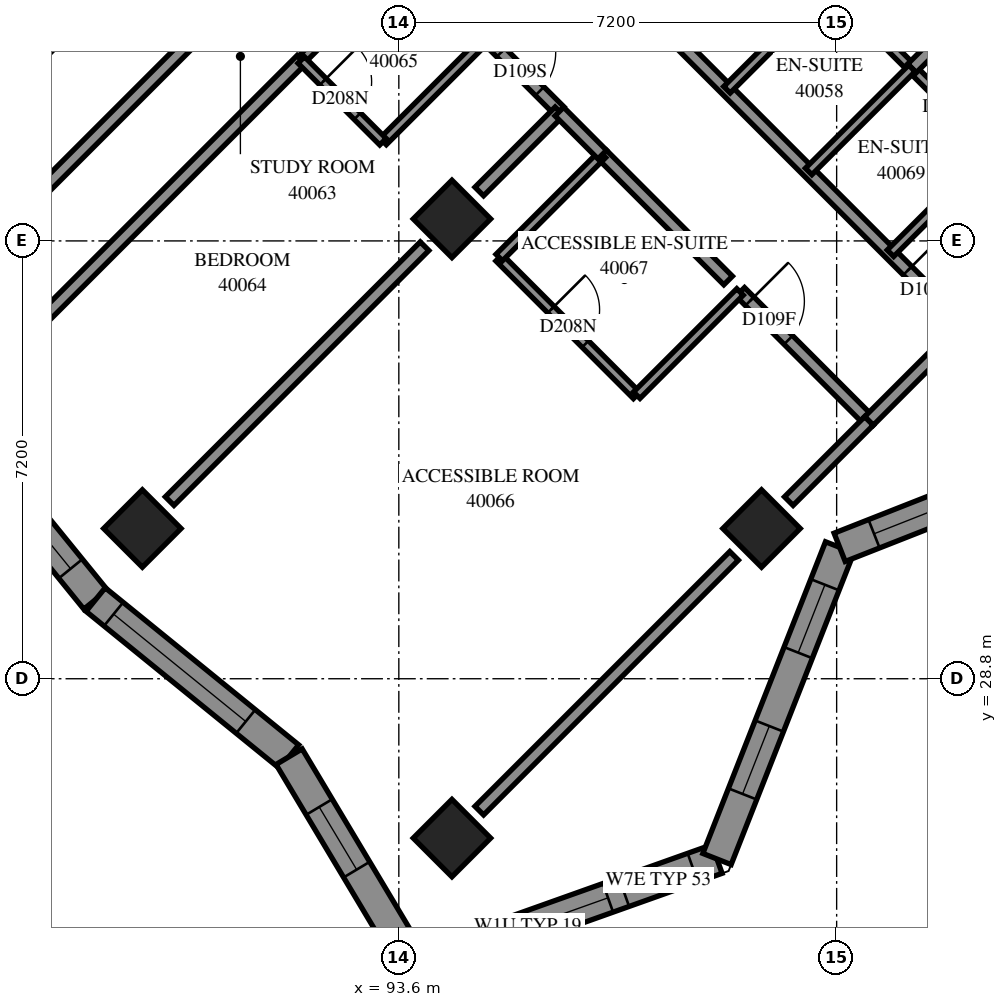
"""IFC4 building model, lengths in metres.
Left out: names, types, materials, properties, quantities, classifications, styles, units other than length and angle.
Written with IfcOpenShell. Run it as: python <this file> out.ifc"""

import sys

from ifc_helpers import new_model, si_unit, direction, frame, frame_2d, origin, origin_2d, place, context, subcontext, project, spatial, polyline, rectangle, outline, extrude, element, fill, save


model = new_model("IFC4")
c1 = context("Model", 3, precision=1e-05, world=origin(), true_north=direction((0.0, 1.0)))
c2 = subcontext(c1, "Body", "Model", "MODEL_VIEW")
j1 = project(units=[si_unit("LENGTHUNIT", "METRE"), si_unit("PLANEANGLEUNIT", "RADIAN")], contexts=[c1])
p1 = place(None, origin())
s1 = spatial("IfcSite", under=j1, at=p1, CompositionType="ELEMENT")
p2 = place(p1, origin())
s2 = spatial("IfcBuilding", under=s1, at=p2, CompositionType="ELEMENT")
p3 = place(p2, frame((0.0, 0.0, 149.0)))
s3 = spatial("IfcBuildingStorey", under=s2, at=p3, CompositionType="ELEMENT", Elevation=149.0)
for number, where, z_axis, x_axis in (
    (1, (94.474, 36.362, 0.0), (0.0, 0.0, 1.0), (0.707, -0.707, 0.0)),
    (2, (89.382, 31.271, 0.0), (0.0, 0.0, 1.0), (0.707, -0.707, 0.0)),
    (3, (99.565, 31.271, 0.0), (0.0, 0.0, 1.0), (0.707, -0.707, 0.0)),
    (4, (94.474, 26.18, 0.0), (0.0, 0.0, 1.0), (0.707, -0.707, 0.0)),
):
    element("IfcColumn", number, at=place(p3, frame(where, z_axis=z_axis, x_axis=x_axis)), inside=s3, PredefinedType="COLUMN", context=c2, shape_type="SweptSolid", body=[
        extrude(rectangle(XDim=0.9, YDim=0.9, at=origin_2d()), origin(), (0.0, 0.0, 1.0), 3.1),
    ])
p4 = place(p3, frame((87.049, 38.695, -0.3), z_axis=(0.0, 0.0, 1.0), x_axis=(0.7071067812, 0.7071067812, 0.0)))
e5 = element("IfcWall", 5, at=p4, inside=s3, PredefinedType="SHEAR", context=c2, shape_type="SweptSolid", body=[
    extrude(rectangle(XDim=14.4, YDim=0.6, at=frame_2d((7.2, 0.0))), origin(), (0.0, 0.0, 1.0), 2.7),
])
p5 = place(p4, frame((4.55, 0.0, 0.3)))
e6 = element("IfcOpeningElement", 6, at=p5, cuts=e5, PredefinedType="OPENING", context=c2, shape_type="SweptSolid", body=[
    extrude(rectangle(XDim=1.1, YDim=2.1, at=frame_2d((0.55, 1.05))), frame((0.0, 0.31, 0.0), z_axis=(0.0, -1.0, 0.0), x_axis=(1.0, 0.0, 0.0)), (0.0, 0.0, 1.0), 0.62),
])
p6 = place(p4, frame((11.35, 0.0, 0.3)))
e7 = element("IfcOpeningElement", 7, at=p6, cuts=e5, PredefinedType="OPENING", context=c2, shape_type="SweptSolid", body=[
    extrude(rectangle(XDim=1.1, YDim=2.1, at=frame_2d((0.55, 1.05))), frame((0.0, 0.31, 0.0), z_axis=(0.0, -1.0, 0.0), x_axis=(1.0, 0.0, 0.0)), (0.0, 0.0, 1.0), 0.62),
])
p7 = place(p3, frame((93.861, 24.065, 0.0), z_axis=(0.0, 0.0, 1.0), x_axis=(0.9420335154, 0.3355187863, 0.0)))
e8 = element("IfcWall", 8, at=p7, inside=s3, PredefinedType="SOLIDWALL", context=c2, shape_type="SweptSolid", body=[
    extrude(outline(polyline([(-0.205, -0.25), (5.391, -0.25), (5.164, 0.25), (0.205, 0.25), (-0.205, -0.25)])), origin(), (0.0, 0.0, 1.0), 3.1),
])
p8 = place(p7, frame((0.575, 0.0, 0.45)))
e9 = element("IfcOpeningElement", 9, at=p8, cuts=e8, PredefinedType="OPENING", context=c2, shape_type="SweptSolid", body=[
    extrude(rectangle(XDim=2.8, YDim=2.5, at=frame_2d((1.4, 1.25))), frame((0.0, 0.26, 0.0), z_axis=(0.0, -1.0, 0.0), x_axis=(1.0, 0.0, 0.0)), (0.0, 0.0, 1.0), 0.52),
])
p9 = place(p7, frame((3.654, 0.0, 0.45)))
e10 = element("IfcOpeningElement", 10, at=p9, cuts=e8, PredefinedType="OPENING", context=c2, shape_type="SweptSolid", body=[
    extrude(rectangle(XDim=1.2, YDim=2.5, at=frame_2d((0.6, 1.25))), frame((0.0, 0.26, 0.0), z_axis=(0.0, -1.0, 0.0), x_axis=(1.0, 0.0, 0.0)), (0.0, 0.0, 1.0), 0.52),
])
p10 = place(p3, frame((98.832, 25.835, 0.0), z_axis=(0.0, 0.0, 1.0), x_axis=(0.3662139942, 0.9305306607, 0.0)))
e11 = element("IfcWall", 11, at=p10, inside=s3, PredefinedType="SOLIDWALL", context=c2, shape_type="SweptSolid", body=[
    extrude(outline(polyline([(-0.114, -0.25), (5.399, -0.25), (5.617, 0.25), (0.114, 0.25), (-0.114, -0.25)])), origin(), (0.0, 0.0, 1.0), 3.1),
])
p11 = place(p10, frame((1.15, 0.0, 0.45)))
e12 = element("IfcOpeningElement", 12, at=p11, cuts=e11, PredefinedType="OPENING", context=c2, shape_type="SweptSolid", body=[
    extrude(rectangle(XDim=1.2, YDim=2.5, at=frame_2d((0.6, 1.25))), frame((0.0, 0.26, 0.0), z_axis=(0.0, -1.0, 0.0), x_axis=(1.0, 0.0, 0.0)), (0.0, 0.0, 1.0), 0.52),
])
p12 = place(p10, frame((3.647, 0.0, 0.45)))
e13 = element("IfcOpeningElement", 13, at=p12, cuts=e11, PredefinedType="OPENING", context=c2, shape_type="SweptSolid", body=[
    extrude(rectangle(XDim=1.2, YDim=2.5, at=frame_2d((0.6, 1.25))), frame((0.0, 0.26, 0.0), z_axis=(0.0, -1.0, 0.0), x_axis=(1.0, 0.0, 0.0)), (0.0, 0.0, 1.0), 0.52),
])
p13 = place(p3, frame((100.849, 30.961, 0.0), z_axis=(0.0, 0.0, 1.0), x_axis=(0.9305330954, 0.3662078077, 0.0)))
e14 = element("IfcWall", 14, at=p13, inside=s3, PredefinedType="SOLIDWALL", context=c2, shape_type="SweptSolid", body=[
    extrude(outline(polyline([(0.109, -0.25), (5.622, -0.25), (5.395, 0.25), (-0.109, 0.25), (0.109, -0.25)])), origin(), (0.0, 0.0, 1.0), 3.1),
])
p14 = place(p13, frame((0.608, 0.0, 0.45)))
e15 = element("IfcOpeningElement", 15, at=p14, cuts=e14, PredefinedType="OPENING", context=c2, shape_type="SweptSolid", body=[
    extrude(rectangle(XDim=2.8, YDim=2.5, at=frame_2d((1.4, 1.25))), frame((0.0, 0.26, 0.0), z_axis=(0.0, -1.0, 0.0), x_axis=(1.0, 0.0, 0.0)), (0.0, 0.0, 1.0), 0.52),
])
p15 = place(p3, frame((86.042, 33.269, 0.0), z_axis=(0.0, 0.0, 1.0), x_axis=(0.6303840779, -0.7762833982, 0.0)))
e16 = element("IfcWall", 16, at=p15, inside=s3, PredefinedType="SOLIDWALL", context=c2, shape_type="SweptSolid", body=[
    extrude(outline(polyline([(0.026, -0.25), (4.106, -0.25), (4.054, 0.25), (-0.026, 0.25), (0.026, -0.25)])), origin(), (0.0, 0.0, 1.0), 3.1),
])
p16 = place(p15, frame((0.627, 0.0, 0.45)))
e17 = element("IfcOpeningElement", 17, at=p16, cuts=e16, PredefinedType="OPENING", context=c2, shape_type="SweptSolid", body=[
    extrude(rectangle(XDim=2.8, YDim=2.5, at=frame_2d((1.4, 1.25))), frame((0.0, 0.26, 0.0), z_axis=(0.0, -1.0, 0.0), x_axis=(1.0, 0.0, 0.0)), (0.0, 0.0, 1.0), 0.52),
])
p17 = place(p3, frame((88.614, 30.102, 0.0), z_axis=(0.0, 0.0, 1.0), x_axis=(0.7762871195, -0.6303794952, 0.0)))
e18 = element("IfcWall", 18, at=p17, inside=s3, PredefinedType="SOLIDWALL", context=c2, shape_type="SweptSolid", body=[
    extrude(outline(polyline([(-0.026, -0.25), (4.054, -0.25), (4.143, 0.25), (0.026, 0.25), (-0.026, -0.25)])), origin(), (0.0, 0.0, 1.0), 3.1),
])
p18 = place(p17, frame((0.38, 0.0, 0.45)))
e19 = element("IfcOpeningElement", 19, at=p18, cuts=e18, PredefinedType="OPENING", context=c2, shape_type="SweptSolid", body=[
    extrude(rectangle(XDim=2.8, YDim=2.5, at=frame_2d((1.4, 1.25))), frame((0.0, 0.26, 0.0), z_axis=(0.0, -1.0, 0.0), x_axis=(1.0, 0.0, 0.0)), (0.0, 0.0, 1.0), 0.52),
])
p19 = place(p3, frame((91.796, 27.518, 0.0), z_axis=(0.0, 0.0, 1.0), x_axis=(0.5132417067, -0.8582441089, 0.0)))
e20 = element("IfcWall", 20, at=p19, inside=s3, PredefinedType="SOLIDWALL", context=c2, shape_type="SweptSolid", body=[
    extrude(outline(polyline([(0.044, -0.25), (4.229, -0.25), (3.819, 0.25), (-0.044, 0.25), (0.044, -0.25)])), origin(), (0.0, 0.0, 1.0), 3.1),
])
p20 = place(p19, frame((0.964, 0.0, 0.45)))
e21 = element("IfcOpeningElement", 21, at=p20, cuts=e20, PredefinedType="OPENING", context=c2, shape_type="SweptSolid", body=[
    extrude(rectangle(XDim=1.2, YDim=2.5, at=frame_2d((0.6, 1.25))), frame((0.0, 0.26, 0.0), z_axis=(0.0, -1.0, 0.0), x_axis=(1.0, 0.0, 0.0)), (0.0, 0.0, 1.0), 0.52),
])
p21 = place(p3, frame((94.189, 43.287, 0.0), z_axis=(0.0, 0.0, 1.0), x_axis=(0.7071067812, -0.7071067812, 0.0)))
e22 = element("IfcWall", 22, at=p21, inside=s3, PredefinedType="PARTITIONING", context=c2, shape_type="SweptSolid", body=[
    extrude(rectangle(XDim=12.298, YDim=0.2, at=frame_2d((6.149, 0.0))), origin(), (0.0, 0.0, 1.0), 3.1),
])
p22 = place(p21, frame((3.755, 0.0, 0.0)))
e23 = element("IfcOpeningElement", 23, at=p22, cuts=e22, PredefinedType="OPENING", context=c2, shape_type="SweptSolid", body=[
    extrude(rectangle(XDim=0.9, YDim=2.1, at=frame_2d((0.45, 1.05))), frame((0.0, 0.11, 0.0), z_axis=(0.0, -1.0, 0.0), x_axis=(1.0, 0.0, 0.0)), (0.0, 0.0, 1.0), 0.22),
])
p23 = place(p21, frame((10.998, 0.0, 0.0)))
e24 = element("IfcOpeningElement", 24, at=p23, cuts=e22, PredefinedType="OPENING", context=c2, shape_type="SweptSolid", body=[
    extrude(rectangle(XDim=0.9, YDim=2.1, at=frame_2d((0.45, 1.05))), frame((0.0, 0.11, 0.0), z_axis=(0.0, -1.0, 0.0), x_axis=(1.0, 0.0, 0.0)), (0.0, 0.0, 1.0), 0.22),
])
p24 = place(p3, frame((86.836, 35.938, 0.0), z_axis=(0.0, 0.0, 1.0), x_axis=(0.7071067812, 0.7071067812, 0.0)))
e25 = element("IfcWall", 25, at=p24, inside=s3, PredefinedType="PARTITIONING", context=c2, shape_type="SweptSolid", body=[
    extrude(rectangle(XDim=8.2, YDim=0.2, at=frame_2d((4.1, 0.0))), origin(), (0.0, 0.0, 1.0), 3.1),
])
p25 = place(p3, frame((86.33, 33.311, 0.0), z_axis=(0.0, 0.0, 1.0), x_axis=(0.7071005427, 0.7071130196, 0.0)))
e26 = element("IfcWall", 26, at=p25, inside=s3, PredefinedType="PARTITIONING", context=c2, shape_type="SweptSolid", body=[
    extrude(rectangle(XDim=8.015, YDim=0.2, at=frame_2d((4.007, 0.0))), origin(), (0.0, 0.0, 1.0), 3.1),
])
p26 = place(p3, frame((89.831, 31.721, 0.0), z_axis=(0.0, 0.0, 1.0), x_axis=(0.7071067812, 0.7071067812, 0.0)))
e27 = element("IfcWall", 27, at=p26, inside=s3, PredefinedType="PARTITIONING", context=c2, shape_type="SweptSolid", body=[
    extrude(rectangle(XDim=5.928, YDim=0.2, at=frame_2d((2.964, 0.0))), origin(), (0.0, 0.0, 1.0), 3.1),
])
p27 = place(p3, frame((94.923, 26.631, 0.0), z_axis=(0.0, 0.0, 1.0), x_axis=(0.7071067812, 0.7071067812, 0.0)))
e28 = element("IfcWall", 28, at=p27, inside=s3, PredefinedType="PARTITIONING", context=c2, shape_type="SweptSolid", body=[
    extrude(rectangle(XDim=5.926, YDim=0.2, at=frame_2d((2.963, 0.0))), origin(), (0.0, 0.0, 1.0), 2.6),
])
p28 = place(p3, frame((92.639, 41.739, 0.0), z_axis=(0.0, 0.0, 1.0), x_axis=(0.7071067812, -0.7071067812, 0.0)))
e29 = element("IfcWall", 29, at=p28, inside=s3, PredefinedType="PARTITIONING", context=c2, shape_type="SweptSolid", body=[
    extrude(rectangle(XDim=5.1, YDim=0.2, at=frame_2d((2.55, 0.0))), origin(), (0.0, 0.0, 1.0), 3.1),
])
p29 = place(p28, frame((0.123, 0.0, 0.0)))
e30 = element("IfcOpeningElement", 30, at=p29, cuts=e29, PredefinedType="OPENING", context=c2, shape_type="SweptSolid", body=[
    extrude(rectangle(XDim=1.0, YDim=2.1, at=frame_2d((0.5, 1.05))), frame((0.0, 0.11, 0.0), z_axis=(0.0, -1.0, 0.0), x_axis=(1.0, 0.0, 0.0)), (0.0, 0.0, 1.0), 0.22),
])
p30 = place(p28, frame((3.734, 0.0, 0.0)))
e31 = element("IfcOpeningElement", 31, at=p30, cuts=e29, PredefinedType="OPENING", context=c2, shape_type="SweptSolid", body=[
    extrude(rectangle(XDim=0.9, YDim=2.1, at=frame_2d((0.45, 1.05))), frame((0.0, 0.11, 0.0), z_axis=(0.0, -1.0, 0.0), x_axis=(1.0, 0.0, 0.0)), (0.0, 0.0, 1.0), 0.22),
])
p31 = place(p3, frame((100.694, 40.178, 0.0), z_axis=(0.0, 0.0, 1.0), x_axis=(0.7076329021, -0.7065802685, 0.0)))
e32 = element("IfcWall", 32, at=p31, inside=s3, PredefinedType="PARTITIONING", context=c2, shape_type="SweptSolid", body=[
    extrude(rectangle(XDim=3.8, YDim=0.15, at=frame_2d((1.9, 0.0))), origin(), (0.0, 0.0, 1.0), 3.1),
])
p32 = place(p31, frame((0.598, 0.0, 0.0)))
e33 = element("IfcOpeningElement", 33, at=p32, cuts=e32, PredefinedType="OPENING", context=c2, shape_type="SweptSolid", body=[
    extrude(rectangle(XDim=0.8, YDim=2.1, at=frame_2d((0.4, 1.05))), frame((0.0, 0.085, 0.0), z_axis=(0.0, -1.0, 0.0), x_axis=(1.0, 0.0, 0.0)), (0.0, 0.0, 1.0), 0.17),
])
p33 = place(p31, frame((2.405, 0.0, 0.0)))
e34 = element("IfcOpeningElement", 34, at=p33, cuts=e32, PredefinedType="OPENING", context=c2, shape_type="SweptSolid", body=[
    extrude(rectangle(XDim=0.8, YDim=2.1, at=frame_2d((0.4, 1.05))), frame((0.0, 0.085, 0.0), z_axis=(0.0, -1.0, 0.0), x_axis=(1.0, 0.0, 0.0)), (0.0, 0.0, 1.0), 0.17),
])
p34 = place(p3, frame((95.249, 35.723, 0.0), z_axis=(0.0, 0.0, 1.0), x_axis=(0.7067942478, -0.7074191764, 0.0)))
e35 = element("IfcWall", 35, at=p34, inside=s3, PredefinedType="PARTITIONING", context=c2, shape_type="SweptSolid", body=[
    extrude(rectangle(XDim=3.2, YDim=0.15, at=frame_2d((1.6, 0.0))), origin(), (0.0, 0.0, 1.0), 3.1),
])
p35 = place(p34, frame((1.206, 0.0, 0.0)))
e36 = element("IfcOpeningElement", 36, at=p35, cuts=e35, PredefinedType="OPENING", context=c2, shape_type="SweptSolid", body=[
    extrude(rectangle(XDim=0.8, YDim=2.1, at=frame_2d((0.4, 1.05))), frame((0.0, 0.085, 0.0), z_axis=(0.0, -1.0, 0.0), x_axis=(1.0, 0.0, 0.0)), (0.0, 0.0, 1.0), 0.17),
])
p36 = place(p3, frame((102.04, 38.838, 0.0), z_axis=(0.0, 0.0, 1.0), x_axis=(0.7071067812, 0.7071067812, 0.0)))
e37 = element("IfcWall", 37, at=p36, inside=s3, PredefinedType="PARTITIONING", context=c2, shape_type="SweptSolid", body=[
    extrude(rectangle(XDim=3.199, YDim=0.2, at=frame_2d((1.599, 0.0))), origin(), (0.0, 0.0, 1.0), 3.1),
])
p37 = place(p3, frame((99.214, 35.162, 0.0), z_axis=(0.0, 0.0, 1.0), x_axis=(0.706773319, -0.7074400862, 0.0)))
e38 = element("IfcWall", 38, at=p37, inside=s3, PredefinedType="PARTITIONING", context=c2, shape_type="SweptSolid", body=[
    extrude(rectangle(XDim=2.999, YDim=0.2, at=frame_2d((1.5, 0.0))), origin(), (0.0, 0.0, 1.0), 3.1),
])
p38 = place(p37, frame((0.22, 0.0, 0.0)))
e39 = element("IfcOpeningElement", 39, at=p38, cuts=e38, PredefinedType="OPENING", context=c2, shape_type="SweptSolid", body=[
    extrude(rectangle(XDim=0.9, YDim=2.1, at=frame_2d((0.45, 1.05))), frame((0.0, 0.11, 0.0), z_axis=(0.0, -1.0, 0.0), x_axis=(1.0, 0.0, 0.0)), (0.0, 0.0, 1.0), 0.22),
])
p39 = place(p3, frame((96.945, 37.419, 0.0), z_axis=(0.0, 0.0, 1.0), x_axis=(0.7071067812, -0.7071067812, 0.0)))
e40 = element("IfcWall", 40, at=p39, inside=s3, PredefinedType="PARTITIONING", context=c2, shape_type="SweptSolid", body=[
    extrude(rectangle(XDim=2.927, YDim=0.2, at=frame_2d((1.464, 0.0))), origin(), (0.0, 0.0, 1.0), 3.1),
])
for number, where, z_axis, x_axis in (
    (41, (97.513, 33.463, 0.0), (0.0, 0.0, 1.0), (0.707, 0.707, 0.0)),
    (42, (93.341, 37.635, 0.0), (0.0, 0.0, 1.0), (0.707, 0.707, 0.0)),
    (43, (101.685, 35.797, 0.0), (0.0, 0.0, 1.0), (0.707, 0.707, 0.0)),
    (44, (91.997, 38.979, 0.0), (0.0, 0.0, 1.0), (0.707, 0.707, 0.0)),
):
    element("IfcWall", number, at=place(p3, frame(where, z_axis=z_axis, x_axis=x_axis)), inside=s3, PredefinedType="PARTITIONING", context=c2, shape_type="SweptSolid", body=[
        extrude(rectangle(XDim=2.401, YDim=0.15, at=frame_2d((1.201, 0.0))), origin(), (0.0, 0.0, 1.0), 3.1),
    ])
for number, where, z_axis, x_axis in (
    (45, (100.34, 37.142, 0.0), (0.0, 0.0, 1.0), (0.708, 0.707, 0.0)),
    (46, (98.996, 38.486, 0.0), (0.0, 0.0, 1.0), (0.708, 0.707, 0.0)),
):
    element("IfcWall", number, at=place(p3, frame(where, z_axis=z_axis, x_axis=x_axis)), inside=s3, PredefinedType="PARTITIONING", context=c2, shape_type="SweptSolid", body=[
        extrude(rectangle(XDim=2.4, YDim=0.15, at=frame_2d((1.2, 0.0))), origin(), (0.0, 0.0, 1.0), 3.1),
    ])
p40 = place(p3, frame((95.251, 35.727, 0.0), z_axis=(0.0, 0.0, 1.0), x_axis=(0.7071067812, 0.7071067812, 0.0)))
e47 = element("IfcWall", 47, at=p40, inside=s3, PredefinedType="PARTITIONING", context=c2, shape_type="SweptSolid", body=[
    extrude(rectangle(XDim=2.398, YDim=0.15, at=frame_2d((1.199, 0.0))), origin(), (0.0, 0.0, 1.0), 3.1),
])
p41 = place(p3, frame((101.331, 33.039, 0.0), z_axis=(0.0, 0.0, 1.0), x_axis=(0.7071067812, 0.7071067812, 0.0)))
e48 = element("IfcWall", 48, at=p41, inside=s3, PredefinedType="PARTITIONING", context=c2, shape_type="SweptSolid", body=[
    extrude(rectangle(XDim=2.2, YDim=0.2, at=frame_2d((1.1, 0.0))), origin(), (0.0, 0.0, 1.0), 2.6),
])
p42 = place(p3, frame((91.995, 38.975, 0.0), z_axis=(0.0, 0.0, 1.0), x_axis=(0.7071067812, -0.7071067812, 0.0)))
e49 = element("IfcWall", 49, at=p42, inside=s3, PredefinedType="PARTITIONING", context=c2, shape_type="SweptSolid", body=[
    extrude(rectangle(XDim=1.901, YDim=0.15, at=frame_2d((0.95, 0.0))), origin(), (0.0, 0.0, 1.0), 3.1),
])
p43 = place(p42, frame((0.506, 0.0, 0.0)))
e50 = element("IfcOpeningElement", 50, at=p43, cuts=e49, PredefinedType="OPENING", context=c2, shape_type="SweptSolid", body=[
    extrude(rectangle(XDim=0.8, YDim=2.1, at=frame_2d((0.4, 1.05))), frame((0.0, 0.085, 0.0), z_axis=(0.0, -1.0, 0.0), x_axis=(1.0, 0.0, 0.0)), (0.0, 0.0, 1.0), 0.17),
])
p44 = place(p3, frame((94.923, 36.813, 0.0), z_axis=(0.0, 0.0, 1.0), x_axis=(0.7071067812, 0.7071067812, 0.0)))
e51 = element("IfcWall", 51, at=p44, inside=s3, PredefinedType="PARTITIONING", context=c2, shape_type="SweptSolid", body=[
    extrude(rectangle(XDim=1.864, YDim=0.2, at=frame_2d((0.932, 0.0))), origin(), (0.0, 0.0, 1.0), 3.1),
])
p45 = place(p3, frame((100.013, 31.721, 0.0), z_axis=(0.0, 0.0, 1.0), x_axis=(0.7071067812, 0.7071067812, 0.0)))
e52 = element("IfcWall", 52, at=p45, inside=s3, PredefinedType="PARTITIONING", context=c2, shape_type="SweptSolid", body=[
    extrude(rectangle(XDim=1.864, YDim=0.2, at=frame_2d((0.932, 0.0))), origin(), (0.0, 0.0, 1.0), 2.6),
])
p46 = place(p3, frame((96.24, 38.128, 0.0), z_axis=(0.0, 0.0, 1.0), x_axis=(0.7061059238, -0.7081062239, 0.0)))
e53 = element("IfcWall", 53, at=p46, inside=s3, PredefinedType="PARTITIONING", context=c2, shape_type="SweptSolid", body=[
    extrude(rectangle(XDim=1.0, YDim=0.2, at=frame_2d((0.5, 0.0))), origin(), (0.0, 0.0, 1.0), 3.1),
])
p47 = place(p8, origin())
e54 = element("IfcWindow", 54, at=p47, inside=s3, PartitioningType="SINGLE_PANEL", PredefinedType="WINDOW", context=c2, shape_type="SweptSolid", body=[
    extrude(rectangle(XDim=2.8, YDim=2.5, at=frame_2d((1.4, 1.25))), frame((0.0, 0.18, 0.0), z_axis=(0.0, -1.0, 0.0), x_axis=(1.0, 0.0, 0.0)), (0.0, 0.0, 1.0), 0.06),
])
fill(e9, e54)
p48 = place(p9, origin())
e55 = element("IfcWindow", 55, at=p48, inside=s3, PartitioningType="SINGLE_PANEL", PredefinedType="WINDOW", context=c2, shape_type="SweptSolid", body=[
    extrude(rectangle(XDim=1.2, YDim=2.5, at=frame_2d((0.6, 1.25))), frame((0.0, 0.18, 0.0), z_axis=(0.0, -1.0, 0.0), x_axis=(1.0, 0.0, 0.0)), (0.0, 0.0, 1.0), 0.06),
])
fill(e10, e55)
p49 = place(p11, origin())
e56 = element("IfcWindow", 56, at=p49, inside=s3, PartitioningType="SINGLE_PANEL", PredefinedType="WINDOW", context=c2, shape_type="SweptSolid", body=[
    extrude(rectangle(XDim=1.2, YDim=2.5, at=frame_2d((0.6, 1.25))), frame((0.0, 0.18, 0.0), z_axis=(0.0, -1.0, 0.0), x_axis=(1.0, 0.0, 0.0)), (0.0, 0.0, 1.0), 0.06),
])
fill(e12, e56)
p50 = place(p12, origin())
e57 = element("IfcWindow", 57, at=p50, inside=s3, PartitioningType="SINGLE_PANEL", PredefinedType="WINDOW", context=c2, shape_type="SweptSolid", body=[
    extrude(rectangle(XDim=1.2, YDim=2.5, at=frame_2d((0.6, 1.25))), frame((0.0, 0.18, 0.0), z_axis=(0.0, -1.0, 0.0), x_axis=(1.0, 0.0, 0.0)), (0.0, 0.0, 1.0), 0.06),
])
fill(e13, e57)
p51 = place(p14, origin())
e58 = element("IfcWindow", 58, at=p51, inside=s3, PartitioningType="SINGLE_PANEL", PredefinedType="WINDOW", context=c2, shape_type="SweptSolid", body=[
    extrude(rectangle(XDim=2.8, YDim=2.5, at=frame_2d((1.4, 1.25))), frame((0.0, 0.18, 0.0), z_axis=(0.0, -1.0, 0.0), x_axis=(1.0, 0.0, 0.0)), (0.0, 0.0, 1.0), 0.06),
])
fill(e15, e58)
p52 = place(p16, origin())
e59 = element("IfcWindow", 59, at=p52, inside=s3, PartitioningType="SINGLE_PANEL", PredefinedType="WINDOW", context=c2, shape_type="SweptSolid", body=[
    extrude(rectangle(XDim=2.8, YDim=2.5, at=frame_2d((1.4, 1.25))), frame((0.0, 0.18, 0.0), z_axis=(0.0, -1.0, 0.0), x_axis=(1.0, 0.0, 0.0)), (0.0, 0.0, 1.0), 0.06),
])
fill(e17, e59)
p53 = place(p18, origin())
e60 = element("IfcWindow", 60, at=p53, inside=s3, PartitioningType="SINGLE_PANEL", PredefinedType="WINDOW", context=c2, shape_type="SweptSolid", body=[
    extrude(rectangle(XDim=2.8, YDim=2.5, at=frame_2d((1.4, 1.25))), frame((0.0, 0.18, 0.0), z_axis=(0.0, -1.0, 0.0), x_axis=(1.0, 0.0, 0.0)), (0.0, 0.0, 1.0), 0.06),
])
fill(e19, e60)
p54 = place(p20, origin())
e61 = element("IfcWindow", 61, at=p54, inside=s3, PartitioningType="SINGLE_PANEL", PredefinedType="WINDOW", context=c2, shape_type="SweptSolid", body=[
    extrude(rectangle(XDim=1.2, YDim=2.5, at=frame_2d((0.6, 1.25))), frame((0.0, 0.18, 0.0), z_axis=(0.0, -1.0, 0.0), x_axis=(1.0, 0.0, 0.0)), (0.0, 0.0, 1.0), 0.06),
])
fill(e21, e61)
p55 = place(p30, origin())
e62 = element("IfcDoor", 62, at=p55, inside=s3, OperationType="SINGLE_SWING_LEFT", PredefinedType="DOOR", context=c2, shape_type="SweptSolid", body=[
    extrude(rectangle(XDim=0.9, YDim=2.1, at=frame_2d((0.45, 1.05))), frame((0.0, 0.025, 0.0), z_axis=(0.0, -1.0, 0.0), x_axis=(1.0, 0.0, 0.0)), (0.0, 0.0, 1.0), 0.05),
])
fill(e31, e62)
p56 = place(p43, origin())
e63 = element("IfcDoor", 63, at=p56, inside=s3, OperationType="SINGLE_SWING_RIGHT", PredefinedType="DOOR", context=c2, shape_type="SweptSolid", body=[
    extrude(rectangle(XDim=0.8, YDim=2.1, at=frame_2d((0.4, 1.05))), frame((0.0, 0.025, 0.0), z_axis=(0.0, -1.0, 0.0), x_axis=(1.0, 0.0, 0.0)), (0.0, 0.0, 1.0), 0.05),
])
fill(e50, e63)
p57 = place(p38, origin())
e64 = element("IfcDoor", 64, at=p57, inside=s3, OperationType="SINGLE_SWING_RIGHT", PredefinedType="DOOR", context=c2, shape_type="SweptSolid", body=[
    extrude(rectangle(XDim=0.9, YDim=2.1, at=frame_2d((0.45, 1.05))), frame((0.0, 0.025, 0.0), z_axis=(0.0, -1.0, 0.0), x_axis=(1.0, 0.0, 0.0)), (0.0, 0.0, 1.0), 0.05),
])
fill(e39, e64)
p58 = place(p35, origin())
e65 = element("IfcDoor", 65, at=p58, inside=s3, OperationType="SINGLE_SWING_RIGHT", PredefinedType="DOOR", context=c2, shape_type="SweptSolid", body=[
    extrude(rectangle(XDim=0.8, YDim=2.1, at=frame_2d((0.4, 1.05))), frame((0.0, 0.025, 0.0), z_axis=(0.0, -1.0, 0.0), x_axis=(1.0, 0.0, 0.0)), (0.0, 0.0, 1.0), 0.05),
])
fill(e36, e65)
p59 = place(p23, origin())
e66 = element("IfcDoor", 66, at=p59, inside=s3, OperationType="SINGLE_SWING_RIGHT", PredefinedType="DOOR", context=c2, shape_type="SweptSolid", body=[
    extrude(rectangle(XDim=0.9, YDim=2.1, at=frame_2d((0.45, 1.05))), frame((0.0, 0.025, 0.0), z_axis=(0.0, -1.0, 0.0), x_axis=(1.0, 0.0, 0.0)), (0.0, 0.0, 1.0), 0.05),
])
fill(e24, e66)
save(model, sys.argv[1])
